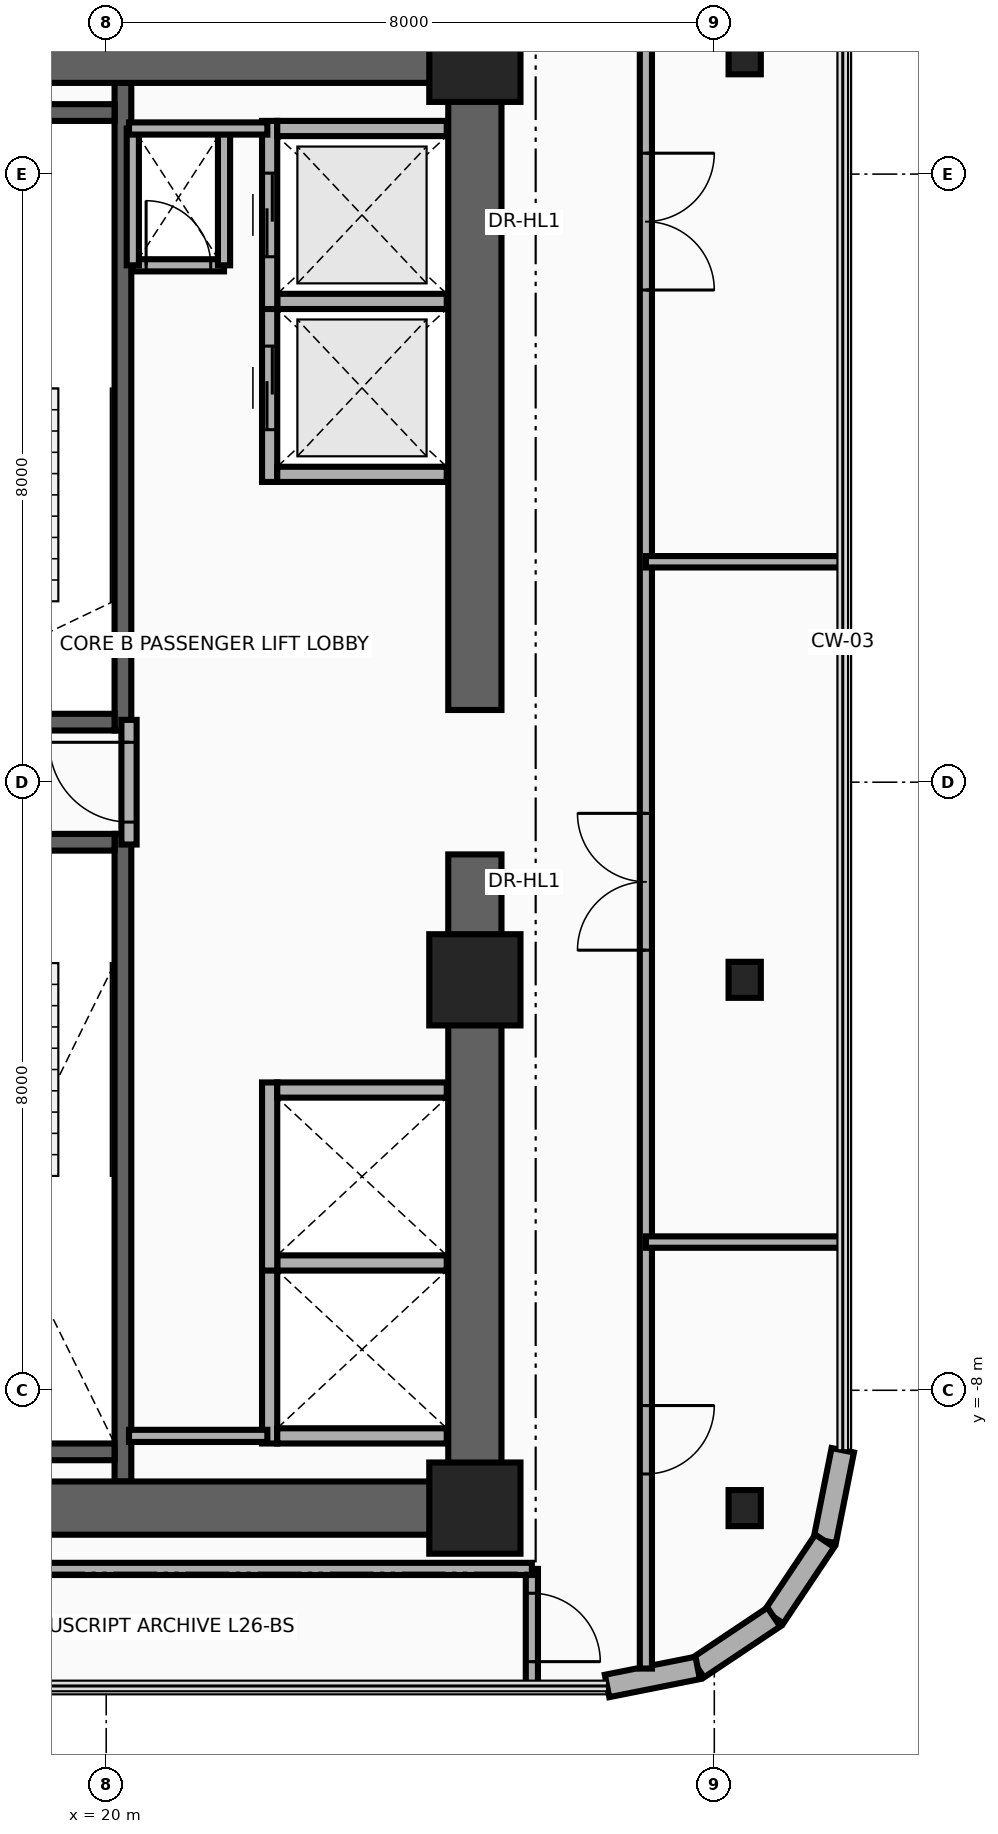
"""IFC4 building model, lengths in metres.
Left out: names, types, materials, properties, quantities, classifications, styles, units other than length and angle.
Written with IfcOpenShell. Run it as: python <this file> out.ifc"""

import sys

from ifc_helpers import new_model, si_unit, direction, frame, frame_2d, origin, origin_2d, place, context, subcontext, project, spatial, rectangle, i_section, extrude, source, transform, mapped, element, fill, save


model = new_model("IFC4")
c1 = context("Model", 3, precision=1e-05, world=origin(), true_north=direction((0.0, 1.0)))
c2 = subcontext(c1, "Body", "Model", "MODEL_VIEW")
j1 = project(units=[si_unit("LENGTHUNIT", "METRE"), si_unit("PLANEANGLEUNIT", "RADIAN")], contexts=[c1])
p1 = place(None, origin())
s1 = spatial("IfcSite", under=j1, at=p1, CompositionType="ELEMENT")
p2 = place(p1, origin())
s2 = spatial("IfcBuilding", under=s1, at=p2, CompositionType="ELEMENT")
p3 = place(p2, frame((0.0, 0.0, 105.7)))
s3 = spatial("IfcBuildingStorey", under=s2, at=p3, CompositionType="ELEMENT", Elevation=105.7)
p4 = place(p3, frame((20.22, 0.68, 0.0), z_axis=(0.0, 0.0, 1.0), x_axis=(0.0, 1.0, 0.0)))
e1 = element("IfcWall", 1, at=p4, inside=s3, PredefinedType="SHEAR", context=c2, shape_type="SweptSolid", body=[
    extrude(rectangle(XDim=8.52, YDim=0.22, at=frame_2d((4.26, 0.0))), origin(), (0.0, 0.0, 1.0), 3.46),
])
p5 = place(p3, frame((17.0, 0.79, 0.0), z_axis=(0.0, 0.0, 1.0), x_axis=(1.0, 0.0, 0.0)))
e2 = element("IfcWall", 2, at=p5, inside=s3, PredefinedType="SHEAR", context=c2, shape_type="SweptSolid", body=[
    extrude(rectangle(XDim=3.11, YDim=0.22, at=frame_2d((1.555, 0.0))), origin(), (0.0, 0.0, 1.0), 3.46),
])
p6 = place(p5, frame((0.95, 0.0, 0.0)))
e3 = element("IfcOpeningElement", 3, at=p6, cuts=e2, PredefinedType="OPENING", context=c2, shape_type="SweptSolid", body=[
    extrude(rectangle(XDim=1.1, YDim=2.15, at=frame_2d((0.55, 1.075))), frame((0.0, 0.125, 0.0), z_axis=(0.0, -1.0, 0.0), x_axis=(1.0, 0.0, 0.0)), (0.0, 0.0, 1.0), 0.25),
])
p7 = place(p3, frame((17.0, 8.81, 0.0), z_axis=(0.0, 0.0, 1.0), x_axis=(1.0, 0.0, 0.0)))
e4 = element("IfcWall", 4, at=p7, inside=s3, PredefinedType="SHEAR", context=c2, shape_type="SweptSolid", body=[
    extrude(rectangle(XDim=3.11, YDim=0.22, at=frame_2d((1.555, 0.0))), origin(), (0.0, 0.0, 1.0), 3.46),
])
p8 = place(p3, frame((20.22, -9.2, 0.0), z_axis=(0.0, 0.0, 1.0), x_axis=(0.0, 1.0, 0.0)))
e5 = element("IfcWall", 5, at=p8, inside=s3, PredefinedType="SHEAR", context=c2, shape_type="SweptSolid", body=[
    extrude(rectangle(XDim=8.52, YDim=0.22, at=frame_2d((4.26, 0.0))), origin(), (0.0, 0.0, 1.0), 3.46),
])
p9 = place(p3, frame((17.0, -8.81, 0.0), z_axis=(0.0, 0.0, 1.0), x_axis=(1.0, 0.0, 0.0)))
e6 = element("IfcWall", 6, at=p9, inside=s3, PredefinedType="SHEAR", context=c2, shape_type="SweptSolid", body=[
    extrude(rectangle(XDim=3.11, YDim=0.22, at=frame_2d((1.555, 0.0))), origin(), (0.0, 0.0, 1.0), 3.46),
])
p10 = place(p3, frame((17.0, -0.79, 0.0), z_axis=(0.0, 0.0, 1.0), x_axis=(1.0, 0.0, 0.0)))
e7 = element("IfcWall", 7, at=p10, inside=s3, PredefinedType="SHEAR", context=c2, shape_type="SweptSolid", body=[
    extrude(rectangle(XDim=3.11, YDim=0.22, at=frame_2d((1.555, 0.0))), origin(), (0.0, 0.0, 1.0), 3.46),
])
p11 = place(p10, frame((0.95, 0.0, 0.0)))
e8 = element("IfcOpeningElement", 8, at=p11, cuts=e7, PredefinedType="OPENING", context=c2, shape_type="SweptSolid", body=[
    extrude(rectangle(XDim=1.1, YDim=2.15, at=frame_2d((0.55, 1.075))), frame((0.0, 0.125, 0.0), z_axis=(0.0, -1.0, 0.0), x_axis=(1.0, 0.0, 0.0)), (0.0, 0.0, 1.0), 0.25),
])
for number, where, z_axis, x_axis in (
    (9, (24.85, -9.9, 0.0), (0.0, 0.0, 1.0), (0.0, 1.0, 0.0)),
    (10, (24.85, 0.95, 0.0), (0.0, 0.0, 1.0), (0.0, 1.0, 0.0)),
):
    element("IfcWall", number, at=place(p3, frame(where, z_axis=z_axis, x_axis=x_axis)), inside=s3, PredefinedType="SHEAR", context=c2, shape_type="SweptSolid", body=[
        extrude(rectangle(XDim=8.95, YDim=0.7, at=frame_2d((4.475, 0.0))), origin(), (0.0, 0.0, 1.0), 3.46),
    ])
for number, where, z_axis, x_axis in (
    (11, (15.85, 9.55, 0.0), (0.0, 0.0, 1.0), (1.0, 0.0, 0.0)),
    (12, (15.85, -9.55, 0.0), (0.0, 0.0, 1.0), (1.0, 0.0, 0.0)),
):
    element("IfcWall", number, at=place(p3, frame(where, z_axis=z_axis, x_axis=x_axis)), inside=s3, PredefinedType="SHEAR", context=c2, shape_type="SweptSolid", body=[
        extrude(rectangle(XDim=9.0, YDim=0.7, at=frame_2d((4.5, 0.0))), origin(), (0.0, 0.0, 1.0), 3.46),
    ])
m1 = source(origin(), c2, "Body", "SweptSolid", [
    extrude(rectangle(XDim=1.2, YDim=1.2, at=origin_2d()), origin(), (0.0, 0.0, 1.0), 3.7),
])
p12 = place(p3, frame((24.85, -9.55, 0.0), z_axis=(0.0, 0.0, 1.0), x_axis=(1.0, 0.0, 0.0)))
e13 = element("IfcColumn", 13, at=p12, inside=s3, PredefinedType="COLUMN", context=c2, shape_type="MappedRepresentation", body=[
    mapped(m1, transform((0.0, 0.0, 0.0), x_axis=(1.0, 0.0, 0.0), y_axis=(0.0, 1.0, 0.0), z_axis=(0.0, 0.0, 1.0), scale=1.0)),
])
m2 = source(origin(), c2, "Body", "SweptSolid", [
    extrude(i_section(OverallWidth=0.424, OverallDepth=0.474, WebThickness=0.048, FlangeThickness=0.077, at=origin_2d()), origin(), (0.0, 0.0, 1.0), 3.7),
])
p13 = place(p3, frame((28.4, -9.55, 0.0), z_axis=(0.0, 0.0, 1.0), x_axis=(1.0, 0.0, 0.0)))
e14 = element("IfcColumn", 14, at=p13, inside=s3, PredefinedType="COLUMN", context=c2, shape_type="MappedRepresentation", body=[
    mapped(m2, transform((0.0, 0.0, 0.0), x_axis=(1.0, 0.0, 0.0), y_axis=(0.0, 1.0, 0.0), z_axis=(0.0, 0.0, 1.0), scale=1.0)),
])
p14 = place(p3, frame((24.85, -2.6, 0.0), z_axis=(0.0, 0.0, 1.0), x_axis=(1.0, 0.0, 0.0)))
e15 = element("IfcColumn", 15, at=p14, inside=s3, PredefinedType="COLUMN", context=c2, shape_type="MappedRepresentation", body=[
    mapped(m1, transform((0.0, 0.0, 0.0), x_axis=(1.0, 0.0, 0.0), y_axis=(0.0, 1.0, 0.0), z_axis=(0.0, 0.0, 1.0), scale=1.0)),
])
p15 = place(p3, frame((28.4, -2.6, 0.0), z_axis=(0.0, 0.0, 1.0), x_axis=(1.0, 0.0, 0.0)))
e16 = element("IfcColumn", 16, at=p15, inside=s3, PredefinedType="COLUMN", context=c2, shape_type="MappedRepresentation", body=[
    mapped(m2, transform((0.0, 0.0, 0.0), x_axis=(1.0, 0.0, 0.0), y_axis=(0.0, 1.0, 0.0), z_axis=(0.0, 0.0, 1.0), scale=1.0)),
])
p16 = place(p3, frame((24.85, 9.55, 0.0), z_axis=(0.0, 0.0, 1.0), x_axis=(1.0, 0.0, 0.0)))
e17 = element("IfcColumn", 17, at=p16, inside=s3, PredefinedType="COLUMN", context=c2, shape_type="MappedRepresentation", body=[
    mapped(m1, transform((0.0, 0.0, 0.0), x_axis=(1.0, 0.0, 0.0), y_axis=(0.0, 1.0, 0.0), z_axis=(0.0, 0.0, 1.0), scale=1.0)),
])
p17 = place(p3, frame((28.4, 9.55, 0.0), z_axis=(0.0, 0.0, 1.0), x_axis=(1.0, 0.0, 0.0)))
e18 = element("IfcColumn", 18, at=p17, inside=s3, PredefinedType="COLUMN", context=c2, shape_type="MappedRepresentation", body=[
    mapped(m2, transform((0.0, 0.0, 0.0), x_axis=(1.0, 0.0, 0.0), y_axis=(0.0, 1.0, 0.0), z_axis=(0.0, 0.0, 1.0), scale=1.0)),
])
p18 = place(p3, frame((29.69, -8.789, 0.0), z_axis=(0.0, 0.0, 1.0), x_axis=(-0.194996050505, -0.980804027463, 0.0)))
e19 = element("IfcWall", 19, at=p18, inside=s3, PredefinedType="SOLIDWALL", context=c2, shape_type="SweptSolid", body=[
    extrude(rectangle(XDim=1.216, YDim=0.3, at=frame_2d((0.608, 0.0))), origin(), (0.0, 0.0, 1.0), 3.46),
])
for number, where, z_axis, x_axis in (
    (20, (29.453, -9.982, 0.0), (0.0, 0.0, 1.0), (-0.556, -0.831, 0.0)),
    (21, (28.783, -10.983, 0.0), (0.0, 0.0, 1.0), (-0.831, -0.556, 0.0)),
):
    element("IfcWall", number, at=place(p3, frame(where, z_axis=z_axis, x_axis=x_axis)), inside=s3, PredefinedType="SOLIDWALL", context=c2, shape_type="SweptSolid", body=[
        extrude(rectangle(XDim=1.205, YDim=0.3, at=frame_2d((0.603, 0.0))), origin(), (0.0, 0.0, 1.0), 3.46),
    ])
p19 = place(p3, frame((27.782, -11.653, 0.0), z_axis=(0.0, 0.0, 1.0), x_axis=(-0.980811661072, -0.194957650543, 0.0)))
e22 = element("IfcWall", 22, at=p19, inside=s3, PredefinedType="SOLIDWALL", context=c2, shape_type="SweptSolid", body=[
    extrude(rectangle(XDim=1.216, YDim=0.3, at=frame_2d((0.608, 0.0))), origin(), (0.0, 0.0, 1.0), 3.46),
])
p20 = place(p3, frame((22.15, -8.7, 0.0), z_axis=(0.0, 0.0, 1.0), x_axis=(0.0, 1.0, 0.0)))
e23 = element("IfcWall", 23, at=p20, inside=s3, PredefinedType="MOVABLE", context=c2, shape_type="SweptSolid", body=[
    extrude(rectangle(XDim=2.475, YDim=0.2, at=frame_2d((1.237, 0.0))), origin(), (0.0, 0.0, 1.0), 3.46),
])
for number, where, z_axis, x_axis in (
    (24, (22.25, -8.6, 0.0), (0.0, 0.0, 1.0), (1.0, 0.0, 0.0)),
    (25, (22.25, -6.325, 0.0), (0.0, 0.0, 1.0), (1.0, 0.0, 0.0)),
):
    element("IfcWall", number, at=place(p3, frame(where, z_axis=z_axis, x_axis=x_axis)), inside=s3, PredefinedType="MOVABLE", context=c2, shape_type="SweptSolid", body=[
        extrude(rectangle(XDim=2.23, YDim=0.2, at=frame_2d((1.115, 0.0))), origin(), (0.0, 0.0, 1.0), 3.46),
    ])
p21 = place(p3, frame((22.15, -6.425, 0.0), z_axis=(0.0, 0.0, 1.0), x_axis=(0.0, 1.0, 0.0)))
e26 = element("IfcWall", 26, at=p21, inside=s3, PredefinedType="MOVABLE", context=c2, shape_type="SweptSolid", body=[
    extrude(rectangle(XDim=2.475, YDim=0.2, at=frame_2d((1.238, 0.0))), origin(), (0.0, 0.0, 1.0), 3.46),
])
p22 = place(p3, frame((22.25, -4.05, 0.0), z_axis=(0.0, 0.0, 1.0), x_axis=(1.0, 0.0, 0.0)))
e27 = element("IfcWall", 27, at=p22, inside=s3, PredefinedType="MOVABLE", context=c2, shape_type="SweptSolid", body=[
    extrude(rectangle(XDim=2.23, YDim=0.2, at=frame_2d((1.115, 0.0))), origin(), (0.0, 0.0, 1.0), 3.46),
])
p23 = place(p3, frame((22.15, 3.95, 0.0), z_axis=(0.0, 0.0, 1.0), x_axis=(0.0, 1.0, 0.0)))
e28 = element("IfcWall", 28, at=p23, inside=s3, PredefinedType="MOVABLE", context=c2, shape_type="SweptSolid", body=[
    extrude(rectangle(XDim=2.475, YDim=0.2, at=frame_2d((1.238, 0.0))), origin(), (0.0, 0.0, 1.0), 3.46),
])
p24 = place(p23, frame((0.688, 0.0, 0.0)))
e29 = element("IfcOpeningElement", 29, at=p24, cuts=e28, PredefinedType="OPENING", context=c2, shape_type="SweptSolid", body=[
    extrude(rectangle(XDim=1.1, YDim=2.1, at=frame_2d((0.55, 1.05))), frame((0.0, 0.115, 0.0), z_axis=(0.0, -1.0, 0.0), x_axis=(1.0, 0.0, 0.0)), (0.0, 0.0, 1.0), 0.23),
])
for number, where, z_axis, x_axis in (
    (30, (22.25, 4.05, 0.0), (0.0, 0.0, 1.0), (1.0, 0.0, 0.0)),
    (31, (22.25, 6.325, 0.0), (0.0, 0.0, 1.0), (1.0, 0.0, 0.0)),
):
    element("IfcWall", number, at=place(p3, frame(where, z_axis=z_axis, x_axis=x_axis)), inside=s3, PredefinedType="MOVABLE", context=c2, shape_type="SweptSolid", body=[
        extrude(rectangle(XDim=2.23, YDim=0.2, at=frame_2d((1.115, 0.0))), origin(), (0.0, 0.0, 1.0), 2.245),
    ])
p25 = place(p3, frame((22.15, 6.225, 0.0), z_axis=(0.0, 0.0, 1.0), x_axis=(0.0, 1.0, 0.0)))
e32 = element("IfcWall", 32, at=p25, inside=s3, PredefinedType="MOVABLE", context=c2, shape_type="SweptSolid", body=[
    extrude(rectangle(XDim=2.475, YDim=0.2, at=frame_2d((1.237, 0.0))), origin(), (0.0, 0.0, 1.0), 3.46),
])
p26 = place(p25, frame((0.688, 0.0, 0.0)))
e33 = element("IfcOpeningElement", 33, at=p26, cuts=e32, PredefinedType="OPENING", context=c2, shape_type="SweptSolid", body=[
    extrude(rectangle(XDim=1.1, YDim=2.1, at=frame_2d((0.55, 1.05))), frame((0.0, 0.115, 0.0), z_axis=(0.0, -1.0, 0.0), x_axis=(1.0, 0.0, 0.0)), (0.0, 0.0, 1.0), 0.23),
])
p27 = place(p3, frame((22.25, 8.6, 0.0), z_axis=(0.0, 0.0, 1.0), x_axis=(1.0, 0.0, 0.0)))
e34 = element("IfcWall", 34, at=p27, inside=s3, PredefinedType="MOVABLE", context=c2, shape_type="SweptSolid", body=[
    extrude(rectangle(XDim=2.23, YDim=0.2, at=frame_2d((1.115, 0.0))), origin(), (0.0, 0.0, 1.0), 2.245),
])
p28 = place(p3, frame((20.3, -0.82, 0.0), z_axis=(0.0, 0.0, 1.0), x_axis=(0.0, 1.0, 0.0)))
e35 = element("IfcWall", 35, at=p28, inside=s3, PredefinedType="PARTITIONING", context=c2, shape_type="SweptSolid", body=[
    extrude(rectangle(XDim=1.64, YDim=0.2, at=frame_2d((0.82, 0.0))), origin(), (0.0, 0.0, 1.0), 3.46),
])
p29 = place(p28, frame((0.295, 0.0, 0.0)))
e36 = element("IfcOpeningElement", 36, at=p29, cuts=e35, PredefinedType="OPENING", context=c2, shape_type="SweptSolid", body=[
    extrude(rectangle(XDim=1.05, YDim=2.15, at=frame_2d((0.525, 1.075))), frame((0.0, 0.115, 0.0), z_axis=(0.0, -1.0, 0.0), x_axis=(1.0, 0.0, 0.0)), (0.0, 0.0, 1.0), 0.23),
])
p30 = place(p3, frame((20.35, 6.8, 0.0), z_axis=(0.0, 0.0, 1.0), x_axis=(1.0, 0.0, 0.0)))
e37 = element("IfcWall", 37, at=p30, inside=s3, PredefinedType="PARTITIONING", context=c2, shape_type="SweptSolid", body=[
    extrude(rectangle(XDim=1.2, YDim=0.16, at=frame_2d((0.6, 0.0))), origin(), (0.0, 0.0, 1.0), 3.46),
])
p31 = place(p30, frame((0.175, 0.0, 0.0)))
e38 = element("IfcOpeningElement", 38, at=p31, cuts=e37, PredefinedType="OPENING", context=c2, shape_type="SweptSolid", body=[
    extrude(rectangle(XDim=0.85, YDim=2.05, at=frame_2d((0.425, 1.025))), frame((0.0, 0.095, 0.0), z_axis=(0.0, -1.0, 0.0), x_axis=(1.0, 0.0, 0.0)), (0.0, 0.0, 1.0), 0.19),
])
for number, where, z_axis, x_axis in (
    (39, (21.55, 6.8, 0.0), (0.0, 0.0, 1.0), (0.0, 1.0, 0.0)),
    (40, (20.35, 6.8, 0.0), (0.0, 0.0, 1.0), (0.0, 1.0, 0.0)),
):
    element("IfcWall", number, at=place(p3, frame(where, z_axis=z_axis, x_axis=x_axis)), inside=s3, PredefinedType="PARTITIONING", context=c2, shape_type="SweptSolid", body=[
        extrude(rectangle(XDim=1.8, YDim=0.16, at=frame_2d((0.9, 0.0))), origin(), (0.0, 0.0, 1.0), 3.46),
    ])
for number, where, z_axis, x_axis in (
    (41, (20.3, -8.6, 0.0), (0.0, 0.0, 1.0), (1.0, 0.0, 0.0)),
    (42, (20.3, 8.6, 0.0), (0.0, 0.0, 1.0), (1.0, 0.0, 0.0)),
):
    element("IfcWall", number, at=place(p3, frame(where, z_axis=z_axis, x_axis=x_axis)), inside=s3, PredefinedType="PARTITIONING", context=c2, shape_type="SweptSolid", body=[
        extrude(rectangle(XDim=1.82, YDim=0.16, at=frame_2d((0.91, 0.0))), origin(), (0.0, 0.0, 1.0), 3.46),
    ])
p32 = place(p3, frame((25.6, -11.89, 0.0), z_axis=(0.0, 0.0, 1.0), x_axis=(0.0, 1.0, 0.0)))
e43 = element("IfcWall", 43, at=p32, inside=s3, PredefinedType="PARTITIONING", context=c2, shape_type="SweptSolid", body=[
    extrude(rectangle(XDim=1.54, YDim=0.16, at=frame_2d((0.77, 0.0))), origin(), (0.0, 0.0, 1.0), 3.46),
])
p33 = place(p32, frame((0.32, 0.0, 0.0)))
e44 = element("IfcOpeningElement", 44, at=p33, cuts=e43, PredefinedType="OPENING", context=c2, shape_type="SweptSolid", body=[
    extrude(rectangle(XDim=0.9, YDim=2.1, at=frame_2d((0.45, 1.05))), frame((0.0, 0.095, 0.0), z_axis=(0.0, -1.0, 0.0), x_axis=(1.0, 0.0, 0.0)), (0.0, 0.0, 1.0), 0.19),
])
p34 = place(p3, frame((14.044, -10.35, 0.0), z_axis=(0.0, 0.0, 1.0), x_axis=(1.0, 0.0, 0.0)))
e45 = element("IfcWall", 45, at=p34, inside=s3, PredefinedType="PARTITIONING", context=c2, shape_type="SweptSolid", body=[
    extrude(rectangle(XDim=11.556, YDim=0.16, at=frame_2d((5.778, 0.0))), origin(), (0.0, 0.0, 1.0), 3.46),
])
p35 = place(p3, frame((27.1, -11.661, 0.0), z_axis=(0.0, 0.0, 1.0), x_axis=(0.0, 1.0, 0.0)))
e46 = element("IfcWall", 46, at=p35, inside=s3, PredefinedType="PARTITIONING", context=c2, shape_type="SweptSolid", body=[
    extrude(rectangle(XDim=23.511, YDim=0.16, at=frame_2d((11.755, 0.0))), origin(), (0.0, 0.0, 1.0), 2.666),
])
p36 = place(p35, frame((2.56, 0.0, 0.0)))
e47 = element("IfcOpeningElement", 47, at=p36, cuts=e46, PredefinedType="OPENING", context=c2, shape_type="SweptSolid", body=[
    extrude(rectangle(XDim=0.9, YDim=2.1, at=frame_2d((0.45, 1.05))), frame((0.0, 0.095, 0.0), z_axis=(0.0, -1.0, 0.0), x_axis=(1.0, 0.0, 0.0)), (0.0, 0.0, 1.0), 0.19),
])
p37 = place(p35, frame((9.451, 0.0, 0.0)))
e48 = element("IfcOpeningElement", 48, at=p37, cuts=e46, PredefinedType="OPENING", context=c2, shape_type="SweptSolid", body=[
    extrude(rectangle(XDim=1.8, YDim=2.15, at=frame_2d((0.9, 1.075))), frame((0.0, 0.095, 0.0), z_axis=(0.0, -1.0, 0.0), x_axis=(1.0, 0.0, 0.0)), (0.0, 0.0, 1.0), 0.19),
])
p38 = place(p35, frame((18.136, 0.0, 0.0)))
e49 = element("IfcOpeningElement", 49, at=p38, cuts=e46, PredefinedType="OPENING", context=c2, shape_type="SweptSolid", body=[
    extrude(rectangle(XDim=1.8, YDim=2.15, at=frame_2d((0.9, 1.075))), frame((0.0, 0.095, 0.0), z_axis=(0.0, -1.0, 0.0), x_axis=(1.0, 0.0, 0.0)), (0.0, 0.0, 1.0), 0.19),
])
for number, where, z_axis, x_axis in (
    (50, (27.1, -6.05, 0.0), (0.0, 0.0, 1.0), (1.0, 0.0, 0.0)),
    (51, (27.1, 2.9, 0.0), (0.0, 0.0, 1.0), (1.0, 0.0, 0.0)),
):
    element("IfcWall", number, at=place(p3, frame(where, z_axis=z_axis, x_axis=x_axis)), inside=s3, PredefinedType="PARTITIONING", context=c2, shape_type="SweptSolid", body=[
        extrude(rectangle(XDim=2.59, YDim=0.15, at=frame_2d((1.295, 0.0))), origin(), (0.0, 0.0, 1.0), 2.896),
    ])
p39 = place(p24, origin())
e52 = element("IfcDoor", 52, at=p39, inside=s3, OperationType="DOUBLE_DOOR_SLIDING", PredefinedType="DOOR", context=c2, shape_type="SweptSolid", body=[
    extrude(rectangle(XDim=1.1, YDim=2.1, at=frame_2d((0.55, 1.05))), frame((0.0, 0.025, 0.0), z_axis=(0.0, -1.0, 0.0), x_axis=(1.0, 0.0, 0.0)), (0.0, 0.0, 1.0), 0.05),
])
fill(e29, e52)
p40 = place(p26, origin())
e53 = element("IfcDoor", 53, at=p40, inside=s3, OperationType="DOUBLE_DOOR_SLIDING", PredefinedType="DOOR", context=c2, shape_type="SweptSolid", body=[
    extrude(rectangle(XDim=1.1, YDim=2.1, at=frame_2d((0.55, 1.05))), frame((0.0, 0.025, 0.0), z_axis=(0.0, -1.0, 0.0), x_axis=(1.0, 0.0, 0.0)), (0.0, 0.0, 1.0), 0.05),
])
fill(e33, e53)
p41 = place(p29, origin())
e54 = element("IfcDoor", 54, at=p41, inside=s3, OperationType="SINGLE_SWING_RIGHT", PredefinedType="DOOR", context=c2, shape_type="SweptSolid", body=[
    extrude(rectangle(XDim=1.05, YDim=2.15, at=frame_2d((0.525, 1.075))), frame((0.0, 0.025, 0.0), z_axis=(0.0, -1.0, 0.0), x_axis=(1.0, 0.0, 0.0)), (0.0, 0.0, 1.0), 0.05),
])
fill(e36, e54)
p42 = place(p31, origin())
e55 = element("IfcDoor", 55, at=p42, inside=s3, OperationType="SINGLE_SWING_LEFT", PredefinedType="DOOR", context=c2, shape_type="SweptSolid", body=[
    extrude(rectangle(XDim=0.85, YDim=2.05, at=frame_2d((0.425, 1.025))), frame((0.0, 0.025, 0.0), z_axis=(0.0, -1.0, 0.0), x_axis=(1.0, 0.0, 0.0)), (0.0, 0.0, 1.0), 0.05),
])
fill(e38, e55)
p43 = place(p33, frame((0.9, 0.0, 0.0), z_axis=(0.0, 0.0, 1.0), x_axis=(-1.0, 0.0, 0.0)))
e56 = element("IfcDoor", 56, at=p43, inside=s3, OperationType="SINGLE_SWING_LEFT", PredefinedType="DOOR", context=c2, shape_type="SweptSolid", body=[
    extrude(rectangle(XDim=0.9, YDim=2.1, at=frame_2d((0.45, 1.05))), frame((0.0, 0.025, 0.0), z_axis=(0.0, -1.0, 0.0), x_axis=(1.0, 0.0, 0.0)), (0.0, 0.0, 1.0), 0.05),
])
fill(e44, e56)
p44 = place(p36, frame((0.9, 0.0, 0.0), z_axis=(0.0, 0.0, 1.0), x_axis=(-1.0, 0.0, 0.0)))
e57 = element("IfcDoor", 57, at=p44, inside=s3, OperationType="SINGLE_SWING_LEFT", PredefinedType="DOOR", context=c2, shape_type="SweptSolid", body=[
    extrude(rectangle(XDim=0.9, YDim=2.1, at=frame_2d((0.45, 1.05))), frame((0.0, 0.025, 0.0), z_axis=(0.0, -1.0, 0.0), x_axis=(1.0, 0.0, 0.0)), (0.0, 0.0, 1.0), 0.05),
])
fill(e47, e57)
p45 = place(p37, origin())
e58 = element("IfcDoor", 58, at=p45, inside=s3, OperationType="DOUBLE_DOOR_SINGLE_SWING", PredefinedType="DOOR", context=c2, shape_type="SweptSolid", body=[
    extrude(rectangle(XDim=1.8, YDim=2.15, at=frame_2d((0.9, 1.075))), frame((0.0, 0.025, 0.0), z_axis=(0.0, -1.0, 0.0), x_axis=(1.0, 0.0, 0.0)), (0.0, 0.0, 1.0), 0.05),
])
fill(e48, e58)
p46 = place(p38, frame((1.8, 0.0, 0.0), z_axis=(0.0, 0.0, 1.0), x_axis=(-1.0, 0.0, 0.0)))
e59 = element("IfcDoor", 59, at=p46, inside=s3, OperationType="DOUBLE_DOOR_SINGLE_SWING", PredefinedType="DOOR", context=c2, shape_type="SweptSolid", body=[
    extrude(rectangle(XDim=1.8, YDim=2.15, at=frame_2d((0.9, 1.075))), frame((0.0, 0.025, 0.0), z_axis=(0.0, -1.0, 0.0), x_axis=(1.0, 0.0, 0.0)), (0.0, 0.0, 1.0), 0.05),
])
fill(e49, e59)
save(model, sys.argv[1])
